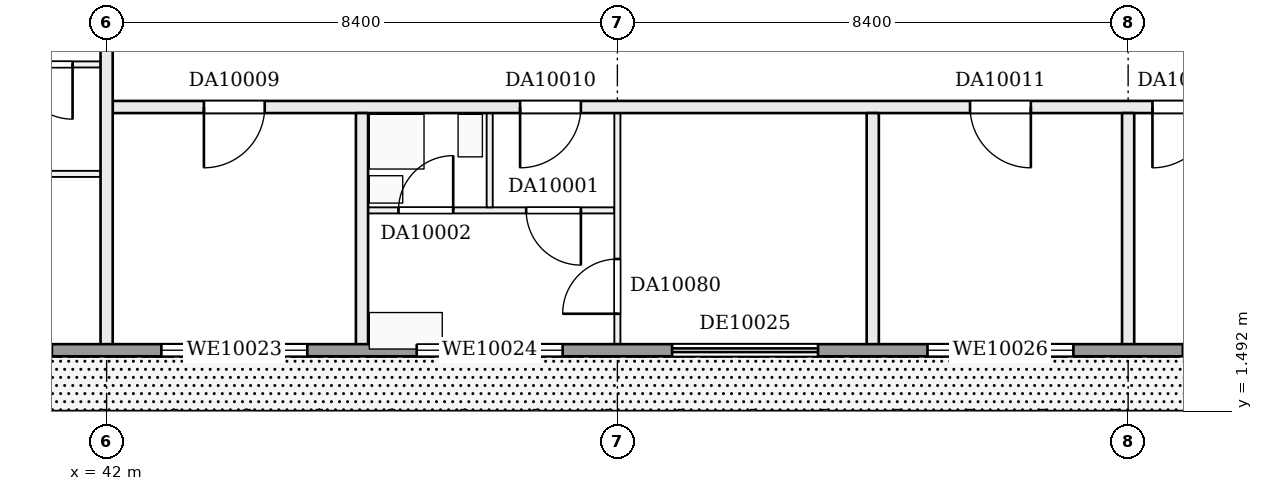
"""IFC4 building model, lengths in metres.
Left out: names, types, materials, properties, quantities, classifications, styles, units other than length and angle.
Written with IfcOpenShell. Run it as: python <this file> out.ifc"""

import sys

from ifc_helpers import new_model, si_unit, direction, frame, frame_2d, origin, place, context, subcontext, project, spatial, rectangle, extrude, element, fill, save


model = new_model("IFC4")
c1 = context("Model", 3, precision=1e-05, world=origin(), true_north=direction((0.0, 1.0)))
c2 = subcontext(c1, "Body", "Model", "MODEL_VIEW")
j1 = project(units=[si_unit("LENGTHUNIT", "METRE"), si_unit("PLANEANGLEUNIT", "RADIAN")], contexts=[c1])
p1 = place(None, origin())
s1 = spatial("IfcSite", under=j1, at=p1, CompositionType="ELEMENT")
p2 = place(p1, origin())
s2 = spatial("IfcBuilding", under=s1, at=p2, CompositionType="ELEMENT")
p3 = place(p2, frame((0.0, 0.0, 46.2)))
s3 = spatial("IfcBuildingStorey", under=s2, at=p3, CompositionType="ELEMENT", Elevation=46.2)
p4 = place(p3, frame((46.3, 4.8, 0.0), z_axis=(0.0, 0.0, 1.0), x_axis=(1.0, 0.0, 0.0)))
e1 = element("IfcWall", 1, at=p4, inside=s3, PredefinedType="PARTITIONING", context=c2, shape_type="SweptSolid", body=[
    extrude(rectangle(XDim=4.05, YDim=0.1, at=frame_2d((2.025, 0.0))), origin(), (0.0, 0.0, 1.0), 3.22),
])
p5 = place(p4, frame((2.6, 0.0, 0.0)))
e2 = element("IfcOpeningElement", 2, at=p5, cuts=e1, PredefinedType="OPENING", context=c2, shape_type="SweptSolid", body=[
    extrude(rectangle(XDim=0.9, YDim=2.1, at=frame_2d((0.45, 1.05))), frame((0.0, 0.06, 0.0), z_axis=(0.0, -1.0, 0.0), x_axis=(1.0, 0.0, 0.0)), (0.0, 0.0, 1.0), 0.12),
])
p6 = place(p4, frame((0.5, 0.0, 0.0)))
e3 = element("IfcOpeningElement", 3, at=p6, cuts=e1, PredefinedType="OPENING", context=c2, shape_type="SweptSolid", body=[
    extrude(rectangle(XDim=0.9, YDim=2.1, at=frame_2d((0.45, 1.05))), frame((0.0, 0.06, 0.0), z_axis=(0.0, -1.0, 0.0), x_axis=(1.0, 0.0, 0.0)), (0.0, 0.0, 1.0), 0.12),
])
p7 = place(p3, frame((37.9, 5.4, 0.0), z_axis=(0.0, 0.0, 1.0), x_axis=(1.0, 0.0, 0.0)))
e4 = element("IfcWall", 4, at=p7, inside=s3, PredefinedType="PARTITIONING", context=c2, shape_type="SweptSolid", body=[
    extrude(rectangle(XDim=4.0, YDim=0.1, at=frame_2d((2.0, 0.0))), origin(), (0.0, 0.0, 1.0), 3.22),
])
p8 = place(p7, frame((1.5, 0.0, 0.0)))
e5 = element("IfcOpeningElement", 5, at=p8, cuts=e4, PredefinedType="OPENING", context=c2, shape_type="SweptSolid", body=[
    extrude(rectangle(XDim=0.9, YDim=2.1, at=frame_2d((0.45, 1.05))), frame((0.0, 0.06, 0.0), z_axis=(0.0, -1.0, 0.0), x_axis=(1.0, 0.0, 0.0)), (0.0, 0.0, 1.0), 0.12),
])
p9 = place(p3, frame((42.1, 6.5, 0.0), z_axis=(0.0, 0.0, 1.0), x_axis=(1.0, 0.0, 0.0)))
e6 = element("IfcWall", 6, at=p9, inside=s3, PredefinedType="PARTITIONING", context=c2, shape_type="SweptSolid", body=[
    extrude(rectangle(XDim=18.7, YDim=0.2, at=frame_2d((9.35, 0.0))), origin(), (0.0, 0.0, 1.0), 3.22),
])
p10 = place(p9, frame((1.5, 0.0, 0.0)))
e7 = element("IfcOpeningElement", 7, at=p10, cuts=e6, PredefinedType="OPENING", context=c2, shape_type="SweptSolid", body=[
    extrude(rectangle(XDim=1.0, YDim=2.1, at=frame_2d((0.5, 1.05))), frame((0.0, 0.11, 0.0), z_axis=(0.0, -1.0, 0.0), x_axis=(1.0, 0.0, 0.0)), (0.0, 0.0, 1.0), 0.22),
])
p11 = place(p9, frame((6.7, 0.0, 0.0)))
e8 = element("IfcOpeningElement", 8, at=p11, cuts=e6, PredefinedType="OPENING", context=c2, shape_type="SweptSolid", body=[
    extrude(rectangle(XDim=1.0, YDim=2.1, at=frame_2d((0.5, 1.05))), frame((0.0, 0.11, 0.0), z_axis=(0.0, -1.0, 0.0), x_axis=(1.0, 0.0, 0.0)), (0.0, 0.0, 1.0), 0.22),
])
p12 = place(p9, frame((14.1, 0.0, 0.0)))
e9 = element("IfcOpeningElement", 9, at=p12, cuts=e6, PredefinedType="OPENING", context=c2, shape_type="SweptSolid", body=[
    extrude(rectangle(XDim=1.0, YDim=2.1, at=frame_2d((0.5, 1.05))), frame((0.0, 0.11, 0.0), z_axis=(0.0, -1.0, 0.0), x_axis=(1.0, 0.0, 0.0)), (0.0, 0.0, 1.0), 0.22),
])
p13 = place(p9, frame((17.1, 0.0, 0.0)))
e10 = element("IfcOpeningElement", 10, at=p13, cuts=e6, PredefinedType="OPENING", context=c2, shape_type="SweptSolid", body=[
    extrude(rectangle(XDim=1.0, YDim=2.1, at=frame_2d((0.5, 1.05))), frame((0.0, 0.11, 0.0), z_axis=(0.0, -1.0, 0.0), x_axis=(1.0, 0.0, 0.0)), (0.0, 0.0, 1.0), 0.22),
])
p14 = place(p3, frame((37.9, 7.2, 0.0), z_axis=(0.0, 0.0, 1.0), x_axis=(1.0, 0.0, 0.0)))
e11 = element("IfcWall", 11, at=p14, inside=s3, PredefinedType="PARTITIONING", context=c2, shape_type="SweptSolid", body=[
    extrude(rectangle(XDim=4.0, YDim=0.1, at=frame_2d((2.0, 0.0))), origin(), (0.0, 0.0, 1.0), 3.22),
])
p15 = place(p14, frame((2.64, 0.0, 0.0)))
e12 = element("IfcOpeningElement", 12, at=p15, cuts=e11, PredefinedType="OPENING", context=c2, shape_type="SweptSolid", body=[
    extrude(rectangle(XDim=0.9, YDim=2.1, at=frame_2d((0.45, 1.05))), frame((0.0, 0.06, 0.0), z_axis=(0.0, -1.0, 0.0), x_axis=(1.0, 0.0, 0.0)), (0.0, 0.0, 1.0), 0.12),
])
p16 = place(p14, frame((0.6, 0.0, 0.0)))
e13 = element("IfcOpeningElement", 13, at=p16, cuts=e11, PredefinedType="OPENING", context=c2, shape_type="SweptSolid", body=[
    extrude(rectangle(XDim=0.9, YDim=2.1, at=frame_2d((0.45, 1.05))), frame((0.0, 0.06, 0.0), z_axis=(0.0, -1.0, 0.0), x_axis=(1.0, 0.0, 0.0)), (0.0, 0.0, 1.0), 0.12),
])
p17 = place(p3, frame((42.0, 2.5, 0.0), z_axis=(0.0, 0.0, 1.0), x_axis=(0.0, 1.0, 0.0)))
e14 = element("IfcWall", 14, at=p17, inside=s3, PredefinedType="PARTITIONING", context=c2, shape_type="SweptSolid", body=[
    extrude(rectangle(XDim=5.9, YDim=0.2, at=frame_2d((2.95, 0.0))), origin(), (0.0, 0.0, 1.0), 3.22),
])
p18 = place(p3, frame((46.2, 2.5, 0.0), z_axis=(0.0, 0.0, 1.0), x_axis=(0.0, 1.0, 0.0)))
e15 = element("IfcWall", 15, at=p18, inside=s3, PredefinedType="PARTITIONING", context=c2, shape_type="SweptSolid", body=[
    extrude(rectangle(XDim=3.9, YDim=0.2, at=frame_2d((1.95, 0.0))), origin(), (0.0, 0.0, 1.0), 3.22),
])
p19 = place(p3, frame((48.3, 4.85, 0.0), z_axis=(0.0, 0.0, 1.0), x_axis=(0.0, 1.0, 0.0)))
e16 = element("IfcWall", 16, at=p19, inside=s3, PredefinedType="PARTITIONING", context=c2, shape_type="SweptSolid", body=[
    extrude(rectangle(XDim=1.55, YDim=0.1, at=frame_2d((0.775, 0.0))), origin(), (0.0, 0.0, 1.0), 3.22),
])
p20 = place(p3, frame((50.4, 2.5, 0.0), z_axis=(0.0, 0.0, 1.0), x_axis=(0.0, 1.0, 0.0)))
e17 = element("IfcWall", 17, at=p20, inside=s3, PredefinedType="PARTITIONING", context=c2, shape_type="SweptSolid", body=[
    extrude(rectangle(XDim=3.9, YDim=0.1, at=frame_2d((1.95, 0.0))), origin(), (0.0, 0.0, 1.0), 3.22),
])
p21 = place(p20, frame((0.6, 0.0, 0.0)))
e18 = element("IfcOpeningElement", 18, at=p21, cuts=e17, PredefinedType="OPENING", context=c2, shape_type="SweptSolid", body=[
    extrude(rectangle(XDim=0.9, YDim=2.1, at=frame_2d((0.45, 1.05))), frame((0.0, 0.06, 0.0), z_axis=(0.0, -1.0, 0.0), x_axis=(1.0, 0.0, 0.0)), (0.0, 0.0, 1.0), 0.12),
])
for number, where, z_axis, x_axis in (
    (19, (54.6, 2.5, 0.0), (0.0, 0.0, 1.0), (0.0, 1.0, 0.0)),
    (20, (58.8, 2.5, 0.0), (0.0, 0.0, 1.0), (0.0, 1.0, 0.0)),
):
    element("IfcWall", number, at=place(p3, frame(where, z_axis=z_axis, x_axis=x_axis)), inside=s3, PredefinedType="PARTITIONING", context=c2, shape_type="SweptSolid", body=[
        extrude(rectangle(XDim=3.9, YDim=0.2, at=frame_2d((1.95, 0.0))), origin(), (0.0, 0.0, 1.0), 3.22),
    ])
p22 = place(p3, frame((4.8, 2.5, 0.0), z_axis=(0.0, 0.0, 1.0), x_axis=(1.0, 0.0, 0.0)))
e21 = element("IfcWall", 21, at=p22, inside=s3, PredefinedType="SOLIDWALL", context=c2, shape_type="SweptSolid", body=[
    extrude(rectangle(XDim=57.6, YDim=0.2, at=frame_2d((28.8, 0.0))), origin(), (0.0, 0.0, 1.0), 3.22),
])
p23 = place(p22, frame((0.3, 0.0, 0.0)))
e22 = element("IfcOpeningElement", 22, at=p23, cuts=e21, PredefinedType="OPENING", context=c2, shape_type="SweptSolid", body=[
    extrude(rectangle(XDim=2.4, YDim=2.2, at=frame_2d((1.2, 1.1))), frame((0.0, 0.11, 0.0), z_axis=(0.0, -1.0, 0.0), x_axis=(1.0, 0.0, 0.0)), (0.0, 0.0, 1.0), 0.22),
])
p24 = place(p22, frame((4.5, 0.0, 0.9)))
e23 = element("IfcOpeningElement", 23, at=p24, cuts=e21, PredefinedType="OPENING", context=c2, shape_type="SweptSolid", body=[
    extrude(rectangle(XDim=2.4, YDim=1.5, at=frame_2d((1.2, 0.75))), frame((0.0, 0.11, 0.0), z_axis=(0.0, -1.0, 0.0), x_axis=(1.0, 0.0, 0.0)), (0.0, 0.0, 1.0), 0.22),
])
p25 = place(p22, frame((8.7, 0.0, 0.9)))
e24 = element("IfcOpeningElement", 24, at=p25, cuts=e21, PredefinedType="OPENING", context=c2, shape_type="SweptSolid", body=[
    extrude(rectangle(XDim=2.4, YDim=1.5, at=frame_2d((1.2, 0.75))), frame((0.0, 0.11, 0.0), z_axis=(0.0, -1.0, 0.0), x_axis=(1.0, 0.0, 0.0)), (0.0, 0.0, 1.0), 0.22),
])
p26 = place(p22, frame((12.9, 0.0, 0.0)))
e25 = element("IfcOpeningElement", 25, at=p26, cuts=e21, PredefinedType="OPENING", context=c2, shape_type="SweptSolid", body=[
    extrude(rectangle(XDim=2.4, YDim=2.2, at=frame_2d((1.2, 1.1))), frame((0.0, 0.11, 0.0), z_axis=(0.0, -1.0, 0.0), x_axis=(1.0, 0.0, 0.0)), (0.0, 0.0, 1.0), 0.22),
])
p27 = place(p22, frame((17.1, 0.0, 0.9)))
e26 = element("IfcOpeningElement", 26, at=p27, cuts=e21, PredefinedType="OPENING", context=c2, shape_type="SweptSolid", body=[
    extrude(rectangle(XDim=2.4, YDim=1.5, at=frame_2d((1.2, 0.75))), frame((0.0, 0.11, 0.0), z_axis=(0.0, -1.0, 0.0), x_axis=(1.0, 0.0, 0.0)), (0.0, 0.0, 1.0), 0.22),
])
p28 = place(p22, frame((21.3, 0.0, 0.9)))
e27 = element("IfcOpeningElement", 27, at=p28, cuts=e21, PredefinedType="OPENING", context=c2, shape_type="SweptSolid", body=[
    extrude(rectangle(XDim=2.4, YDim=1.5, at=frame_2d((1.2, 0.75))), frame((0.0, 0.11, 0.0), z_axis=(0.0, -1.0, 0.0), x_axis=(1.0, 0.0, 0.0)), (0.0, 0.0, 1.0), 0.22),
])
p29 = place(p22, frame((25.5, 0.0, 0.0)))
e28 = element("IfcOpeningElement", 28, at=p29, cuts=e21, PredefinedType="OPENING", context=c2, shape_type="SweptSolid", body=[
    extrude(rectangle(XDim=2.4, YDim=2.2, at=frame_2d((1.2, 1.1))), frame((0.0, 0.11, 0.0), z_axis=(0.0, -1.0, 0.0), x_axis=(1.0, 0.0, 0.0)), (0.0, 0.0, 1.0), 0.22),
])
p30 = place(p22, frame((29.7, 0.0, 0.0)))
e29 = element("IfcOpeningElement", 29, at=p30, cuts=e21, PredefinedType="OPENING", context=c2, shape_type="SweptSolid", body=[
    extrude(rectangle(XDim=2.4, YDim=2.2, at=frame_2d((1.2, 1.1))), frame((0.0, 0.11, 0.0), z_axis=(0.0, -1.0, 0.0), x_axis=(1.0, 0.0, 0.0)), (0.0, 0.0, 1.0), 0.22),
])
p31 = place(p22, frame((33.9, 0.0, 0.0)))
e30 = element("IfcOpeningElement", 30, at=p31, cuts=e21, PredefinedType="OPENING", context=c2, shape_type="SweptSolid", body=[
    extrude(rectangle(XDim=2.4, YDim=2.2, at=frame_2d((1.2, 1.1))), frame((0.0, 0.11, 0.0), z_axis=(0.0, -1.0, 0.0), x_axis=(1.0, 0.0, 0.0)), (0.0, 0.0, 1.0), 0.22),
])
p32 = place(p22, frame((38.1, 0.0, 0.9)))
e31 = element("IfcOpeningElement", 31, at=p32, cuts=e21, PredefinedType="OPENING", context=c2, shape_type="SweptSolid", body=[
    extrude(rectangle(XDim=2.4, YDim=1.5, at=frame_2d((1.2, 0.75))), frame((0.0, 0.11, 0.0), z_axis=(0.0, -1.0, 0.0), x_axis=(1.0, 0.0, 0.0)), (0.0, 0.0, 1.0), 0.22),
])
p33 = place(p22, frame((42.3, 0.0, 0.9)))
e32 = element("IfcOpeningElement", 32, at=p33, cuts=e21, PredefinedType="OPENING", context=c2, shape_type="SweptSolid", body=[
    extrude(rectangle(XDim=2.4, YDim=1.5, at=frame_2d((1.2, 0.75))), frame((0.0, 0.11, 0.0), z_axis=(0.0, -1.0, 0.0), x_axis=(1.0, 0.0, 0.0)), (0.0, 0.0, 1.0), 0.22),
])
p34 = place(p22, frame((46.5, 0.0, 0.0)))
e33 = element("IfcOpeningElement", 33, at=p34, cuts=e21, PredefinedType="OPENING", context=c2, shape_type="SweptSolid", body=[
    extrude(rectangle(XDim=2.4, YDim=2.2, at=frame_2d((1.2, 1.1))), frame((0.0, 0.11, 0.0), z_axis=(0.0, -1.0, 0.0), x_axis=(1.0, 0.0, 0.0)), (0.0, 0.0, 1.0), 0.22),
])
p35 = place(p22, frame((50.7, 0.0, 0.9)))
e34 = element("IfcOpeningElement", 34, at=p35, cuts=e21, PredefinedType="OPENING", context=c2, shape_type="SweptSolid", body=[
    extrude(rectangle(XDim=2.4, YDim=1.5, at=frame_2d((1.2, 0.75))), frame((0.0, 0.11, 0.0), z_axis=(0.0, -1.0, 0.0), x_axis=(1.0, 0.0, 0.0)), (0.0, 0.0, 1.0), 0.22),
])
p36 = place(p22, frame((54.9, 0.0, 0.9)))
e35 = element("IfcOpeningElement", 35, at=p36, cuts=e21, PredefinedType="OPENING", context=c2, shape_type="SweptSolid", body=[
    extrude(rectangle(XDim=2.4, YDim=1.5, at=frame_2d((1.2, 0.75))), frame((0.0, 0.11, 0.0), z_axis=(0.0, -1.0, 0.0), x_axis=(1.0, 0.0, 0.0)), (0.0, 0.0, 1.0), 0.22),
])
p37 = place(p5, frame((0.9, 0.0, 0.0), z_axis=(0.0, 0.0, 1.0), x_axis=(-1.0, 0.0, 0.0)))
e36 = element("IfcDoor", 36, at=p37, inside=s3, OperationType="SINGLE_SWING_LEFT", PredefinedType="DOOR", context=c2, shape_type="SweptSolid", body=[
    extrude(rectangle(XDim=0.9, YDim=2.1, at=frame_2d((0.45, 1.05))), frame((0.0, 0.025, 0.0), z_axis=(0.0, -1.0, 0.0), x_axis=(1.0, 0.0, 0.0)), (0.0, 0.0, 1.0), 0.05),
])
fill(e2, e36)
p38 = place(p6, origin())
e37 = element("IfcDoor", 37, at=p38, inside=s3, OperationType="SINGLE_SWING_RIGHT", PredefinedType="DOOR", context=c2, shape_type="SweptSolid", body=[
    extrude(rectangle(XDim=0.9, YDim=2.1, at=frame_2d((0.45, 1.05))), frame((0.0, 0.025, 0.0), z_axis=(0.0, -1.0, 0.0), x_axis=(1.0, 0.0, 0.0)), (0.0, 0.0, 1.0), 0.05),
])
fill(e3, e37)
p39 = place(p10, frame((1.0, 0.0, 0.0), z_axis=(0.0, 0.0, 1.0), x_axis=(-1.0, 0.0, 0.0)))
e38 = element("IfcDoor", 38, at=p39, inside=s3, OperationType="SINGLE_SWING_RIGHT", PredefinedType="DOOR", context=c2, shape_type="SweptSolid", body=[
    extrude(rectangle(XDim=1.0, YDim=2.1, at=frame_2d((0.5, 1.05))), frame((0.0, 0.025, 0.0), z_axis=(0.0, -1.0, 0.0), x_axis=(1.0, 0.0, 0.0)), (0.0, 0.0, 1.0), 0.05),
])
fill(e7, e38)
p40 = place(p11, frame((1.0, 0.0, 0.0), z_axis=(0.0, 0.0, 1.0), x_axis=(-1.0, 0.0, 0.0)))
e39 = element("IfcDoor", 39, at=p40, inside=s3, OperationType="SINGLE_SWING_RIGHT", PredefinedType="DOOR", context=c2, shape_type="SweptSolid", body=[
    extrude(rectangle(XDim=1.0, YDim=2.1, at=frame_2d((0.5, 1.05))), frame((0.0, 0.025, 0.0), z_axis=(0.0, -1.0, 0.0), x_axis=(1.0, 0.0, 0.0)), (0.0, 0.0, 1.0), 0.05),
])
fill(e8, e39)
p41 = place(p12, frame((1.0, 0.0, 0.0), z_axis=(0.0, 0.0, 1.0), x_axis=(-1.0, 0.0, 0.0)))
e40 = element("IfcDoor", 40, at=p41, inside=s3, OperationType="SINGLE_SWING_LEFT", PredefinedType="DOOR", context=c2, shape_type="SweptSolid", body=[
    extrude(rectangle(XDim=1.0, YDim=2.1, at=frame_2d((0.5, 1.05))), frame((0.0, 0.025, 0.0), z_axis=(0.0, -1.0, 0.0), x_axis=(1.0, 0.0, 0.0)), (0.0, 0.0, 1.0), 0.05),
])
fill(e9, e40)
p42 = place(p13, frame((1.0, 0.0, 0.0), z_axis=(0.0, 0.0, 1.0), x_axis=(-1.0, 0.0, 0.0)))
e41 = element("IfcDoor", 41, at=p42, inside=s3, OperationType="SINGLE_SWING_RIGHT", PredefinedType="DOOR", context=c2, shape_type="SweptSolid", body=[
    extrude(rectangle(XDim=1.0, YDim=2.1, at=frame_2d((0.5, 1.05))), frame((0.0, 0.025, 0.0), z_axis=(0.0, -1.0, 0.0), x_axis=(1.0, 0.0, 0.0)), (0.0, 0.0, 1.0), 0.05),
])
fill(e10, e41)
p43 = place(p15, frame((0.9, 0.0, 0.0), z_axis=(0.0, 0.0, 1.0), x_axis=(-1.0, 0.0, 0.0)))
e42 = element("IfcDoor", 42, at=p43, inside=s3, OperationType="SINGLE_SWING_LEFT", PredefinedType="DOOR", context=c2, shape_type="SweptSolid", body=[
    extrude(rectangle(XDim=0.9, YDim=2.1, at=frame_2d((0.45, 1.05))), frame((0.0, 0.025, 0.0), z_axis=(0.0, -1.0, 0.0), x_axis=(1.0, 0.0, 0.0)), (0.0, 0.0, 1.0), 0.05),
])
fill(e12, e42)
p44 = place(p21, origin())
e43 = element("IfcDoor", 43, at=p44, inside=s3, OperationType="SINGLE_SWING_LEFT", PredefinedType="DOOR", context=c2, shape_type="SweptSolid", body=[
    extrude(rectangle(XDim=0.9, YDim=2.1, at=frame_2d((0.45, 1.05))), frame((0.0, 0.025, 0.0), z_axis=(0.0, -1.0, 0.0), x_axis=(1.0, 0.0, 0.0)), (0.0, 0.0, 1.0), 0.05),
])
fill(e18, e43)
p45 = place(p32, origin())
e44 = element("IfcWindow", 44, at=p45, inside=s3, PartitioningType="SINGLE_PANEL", PredefinedType="WINDOW", context=c2, shape_type="SweptSolid", body=[
    extrude(rectangle(XDim=2.4, YDim=1.5, at=frame_2d((1.2, 0.75))), frame((0.0, 0.03, 0.0), z_axis=(0.0, -1.0, 0.0), x_axis=(1.0, 0.0, 0.0)), (0.0, 0.0, 1.0), 0.06),
])
fill(e31, e44)
p46 = place(p33, origin())
e45 = element("IfcWindow", 45, at=p46, inside=s3, PartitioningType="SINGLE_PANEL", PredefinedType="WINDOW", context=c2, shape_type="SweptSolid", body=[
    extrude(rectangle(XDim=2.4, YDim=1.5, at=frame_2d((1.2, 0.75))), frame((0.0, 0.03, 0.0), z_axis=(0.0, -1.0, 0.0), x_axis=(1.0, 0.0, 0.0)), (0.0, 0.0, 1.0), 0.06),
])
fill(e32, e45)
p47 = place(p34, origin())
e46 = element("IfcDoor", 46, at=p47, inside=s3, OperationType="DOUBLE_DOOR_SLIDING", PredefinedType="DOOR", context=c2, shape_type="SweptSolid", body=[
    extrude(rectangle(XDim=2.4, YDim=2.2, at=frame_2d((1.2, 1.1))), frame((0.0, 0.025, 0.0), z_axis=(0.0, -1.0, 0.0), x_axis=(1.0, 0.0, 0.0)), (0.0, 0.0, 1.0), 0.05),
])
fill(e33, e46)
p48 = place(p35, origin())
e47 = element("IfcWindow", 47, at=p48, inside=s3, PartitioningType="SINGLE_PANEL", PredefinedType="WINDOW", context=c2, shape_type="SweptSolid", body=[
    extrude(rectangle(XDim=2.4, YDim=1.5, at=frame_2d((1.2, 0.75))), frame((0.0, 0.03, 0.0), z_axis=(0.0, -1.0, 0.0), x_axis=(1.0, 0.0, 0.0)), (0.0, 0.0, 1.0), 0.06),
])
fill(e34, e47)
save(model, sys.argv[1])
